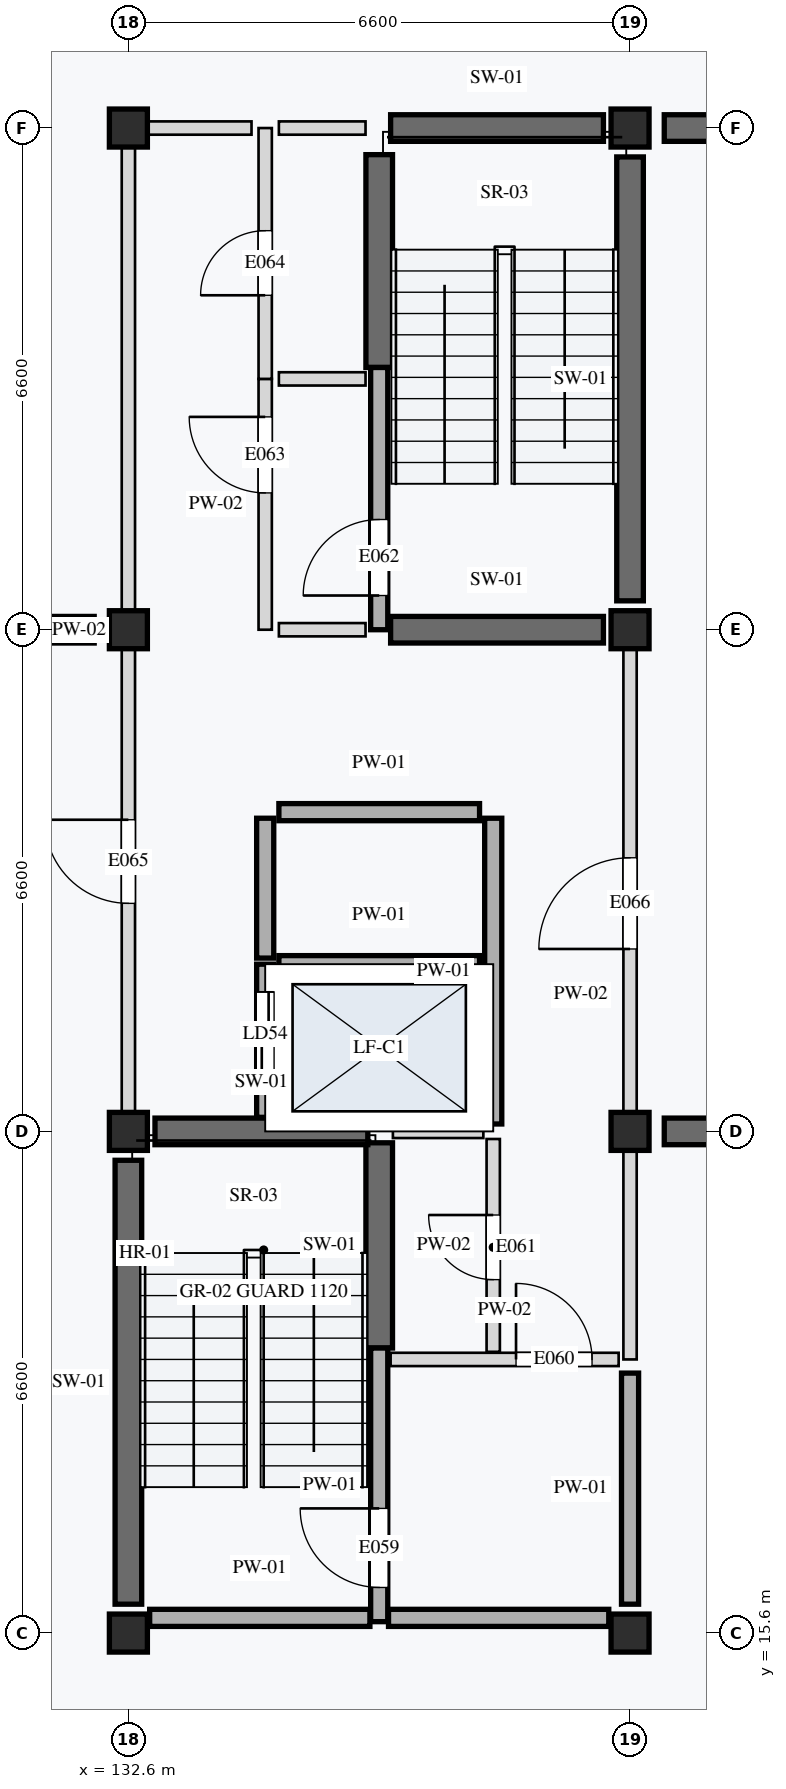
"""IFC4 building model, lengths in metres.
Left out: names, types, materials, properties, quantities, classifications, styles, units other than length and angle.
Written with IfcOpenShell. Run it as: python <this file> out.ifc"""

import sys

from ifc_helpers import new_model, si_unit, direction, frame, frame_2d, origin, origin_2d, place, context, subcontext, project, spatial, rectangle, extrude, element, fill, save


model = new_model("IFC4")
c1 = context("Model", 3, precision=1e-05, world=origin(), true_north=direction((0.0, 1.0)))
c2 = subcontext(c1, "Body", "Model", "MODEL_VIEW")
j1 = project(units=[si_unit("LENGTHUNIT", "METRE"), si_unit("PLANEANGLEUNIT", "RADIAN")], contexts=[c1])
p1 = place(None, origin())
s1 = spatial("IfcSite", under=j1, at=p1, CompositionType="ELEMENT")
p2 = place(p1, origin())
s2 = spatial("IfcBuilding", under=s1, at=p2, CompositionType="ELEMENT")
p3 = place(p2, frame((0.0, 0.0, -3.8)))
s3 = spatial("IfcBuildingStorey", under=s2, at=p3, CompositionType="ELEMENT", Elevation=-3.8)
for number, where, z_axis, x_axis in (
    (1, (132.6, 15.6, 0.0), (0.0, 0.0, 1.0), (1.0, 0.0, 0.0)),
    (2, (139.2, 15.6, 0.0), (0.0, 0.0, 1.0), (1.0, 0.0, 0.0)),
    (3, (132.6, 22.2, 0.0), (0.0, 0.0, 1.0), (1.0, 0.0, 0.0)),
    (4, (139.2, 22.2, 0.0), (0.0, 0.0, 1.0), (1.0, 0.0, 0.0)),
    (5, (132.6, 28.8, 0.0), (0.0, 0.0, 1.0), (1.0, 0.0, 0.0)),
    (6, (139.2, 28.8, 0.0), (0.0, 0.0, 1.0), (1.0, 0.0, 0.0)),
    (7, (132.6, 35.4, 0.0), (0.0, 0.0, 1.0), (1.0, 0.0, 0.0)),
    (8, (139.2, 35.4, 0.0), (0.0, 0.0, 1.0), (1.0, 0.0, 0.0)),
):
    element("IfcColumn", number, at=place(p3, frame(where, z_axis=z_axis, x_axis=x_axis)), inside=s3, PredefinedType="COLUMN", context=c2, shape_type="SweptSolid", body=[
        extrude(rectangle(XDim=0.5, YDim=0.5, at=origin_2d()), origin(), (0.0, 0.0, 1.0), 3.8),
    ])
p4 = place(p3, frame((132.6, 15.98, 0.0), z_axis=(0.0, 0.0, 1.0), x_axis=(0.0, 1.0, 0.0)))
e9 = element("IfcWall", 9, at=p4, inside=s3, PredefinedType="SHEAR", context=c2, shape_type="SweptSolid", body=[
    extrude(rectangle(XDim=5.84, YDim=0.35, at=frame_2d((2.92, 0.0))), origin(), (0.0, 0.0, 1.0), 3.52),
])
p5 = place(p3, frame((135.9, 19.35, 0.0), z_axis=(0.0, 0.0, 1.0), x_axis=(0.0, 1.0, 0.0)))
e10 = element("IfcWall", 10, at=p5, inside=s3, PredefinedType="SHEAR", context=c2, shape_type="SweptSolid", body=[
    extrude(rectangle(XDim=2.7, YDim=0.35, at=frame_2d((1.35, 0.0))), origin(), (0.0, 0.0, 1.0), 3.52),
])
p6 = place(p3, frame((132.95, 22.2, 0.0), z_axis=(0.0, 0.0, 1.0), x_axis=(1.0, 0.0, 0.0)))
e11 = element("IfcWall", 11, at=p6, inside=s3, PredefinedType="SHEAR", context=c2, shape_type="SweptSolid", body=[
    extrude(rectangle(XDim=2.8, YDim=0.35, at=frame_2d((1.4, 0.0))), origin(), (0.0, 0.0, 1.0), 3.52),
])
p7 = place(p3, frame((139.2, 29.18, 0.0), z_axis=(0.0, 0.0, 1.0), x_axis=(0.0, 1.0, 0.0)))
e12 = element("IfcWall", 12, at=p7, inside=s3, PredefinedType="SHEAR", context=c2, shape_type="SweptSolid", body=[
    extrude(rectangle(XDim=5.84, YDim=0.35, at=frame_2d((2.92, 0.0))), origin(), (0.0, 0.0, 1.0), 3.52),
])
for number, where, z_axis, x_axis in (
    (13, (135.9, 32.25, 0.0), (0.0, 0.0, 1.0), (0.0, 1.0, 0.0)),
    (14, (136.05, 28.8, 0.0), (0.0, 0.0, 1.0), (1.0, 0.0, 0.0)),
    (15, (136.05, 35.4, 0.0), (0.0, 0.0, 1.0), (1.0, 0.0, 0.0)),
):
    element("IfcWall", number, at=place(p3, frame(where, z_axis=z_axis, x_axis=x_axis)), inside=s3, PredefinedType="SHEAR", context=c2, shape_type="SweptSolid", body=[
        extrude(rectangle(XDim=2.8, YDim=0.35, at=frame_2d((1.4, 0.0))), origin(), (0.0, 0.0, 1.0), 3.52),
    ])
p8 = place(p3, frame((126.45, 28.8, 0.0), z_axis=(0.0, 0.0, 1.0), x_axis=(1.0, 0.0, 0.0)))
e16 = element("IfcWall", 16, at=p8, inside=s3, PredefinedType="SHEAR", context=c2, shape_type="SweptSolid", body=[
    extrude(rectangle(XDim=5.7, YDim=0.35, at=frame_2d((2.85, 0.0))), origin(), (0.0, 0.0, 1.0), 3.52),
])
for number, where, z_axis, x_axis in (
    (17, (139.65, 22.2, 0.0), (0.0, 0.0, 1.0), (1.0, 0.0, 0.0)),
    (18, (139.65, 35.4, 0.0), (0.0, 0.0, 1.0), (1.0, 0.0, 0.0)),
):
    element("IfcWall", number, at=place(p3, frame(where, z_axis=z_axis, x_axis=x_axis)), inside=s3, PredefinedType="SHEAR", context=c2, shape_type="SweptSolid", body=[
        extrude(rectangle(XDim=5.7, YDim=0.35, at=frame_2d((2.85, 0.0))), origin(), (0.0, 0.0, 1.0), 3.52),
    ])
p9 = place(p3, frame((135.9, 15.75, 0.0), z_axis=(0.0, 0.0, 1.0), x_axis=(0.0, 1.0, 0.0)))
e19 = element("IfcWall", 19, at=p9, inside=s3, PredefinedType="STANDARD", context=c2, shape_type="SweptSolid", body=[
    extrude(rectangle(XDim=3.6, YDim=0.225, at=frame_2d((1.8, 0.0))), origin(), (0.0, 0.0, 1.0), 3.52),
])
p10 = place(p9, frame((0.45, 0.0, 0.0)))
e20 = element("IfcOpeningElement", 20, at=p10, cuts=e19, PredefinedType="OPENING", context=c2, shape_type="SweptSolid", body=[
    extrude(rectangle(XDim=1.04, YDim=2.12, at=frame_2d((0.52, 1.06))), frame((0.0, 0.123, 0.0), z_axis=(0.0, -1.0, 0.0), x_axis=(1.0, 0.0, 0.0)), (0.0, 0.0, 1.0), 0.245),
])
p11 = place(p3, frame((136.05, 19.2, 0.0), z_axis=(0.0, 0.0, 1.0), x_axis=(1.0, 0.0, 0.0)))
e21 = element("IfcWall", 21, at=p11, inside=s3, PredefinedType="PARTITIONING", context=c2, shape_type="SweptSolid", body=[
    extrude(rectangle(XDim=3.0, YDim=0.175, at=frame_2d((1.5, 0.0))), origin(), (0.0, 0.0, 1.0), 3.52),
])
p12 = place(p11, frame((1.65, 0.0, 0.0)))
e22 = element("IfcOpeningElement", 22, at=p12, cuts=e21, PredefinedType="OPENING", context=c2, shape_type="SweptSolid", body=[
    extrude(rectangle(XDim=1.0, YDim=2.1, at=frame_2d((0.5, 1.05))), frame((0.0, 0.097, 0.0), z_axis=(0.0, -1.0, 0.0), x_axis=(1.0, 0.0, 0.0)), (0.0, 0.0, 1.0), 0.195),
])
p13 = place(p3, frame((137.4, 19.3, 0.0), z_axis=(0.0, 0.0, 1.0), x_axis=(0.0, 1.0, 0.0)))
e23 = element("IfcWall", 23, at=p13, inside=s3, PredefinedType="PARTITIONING", context=c2, shape_type="SweptSolid", body=[
    extrude(rectangle(XDim=2.8, YDim=0.175, at=frame_2d((1.4, 0.0))), origin(), (0.0, 0.0, 1.0), 3.52),
])
p14 = place(p13, frame((0.95, 0.0, 0.0)))
e24 = element("IfcOpeningElement", 24, at=p14, cuts=e23, PredefinedType="OPENING", context=c2, shape_type="SweptSolid", body=[
    extrude(rectangle(XDim=0.85, YDim=2.0, at=frame_2d((0.425, 1.0))), frame((0.0, 0.097, 0.0), z_axis=(0.0, -1.0, 0.0), x_axis=(1.0, 0.0, 0.0)), (0.0, 0.0, 1.0), 0.195),
])
p15 = place(p3, frame((136.08, 22.2, 0.0), z_axis=(0.0, 0.0, 1.0), x_axis=(1.0, 0.0, 0.0)))
e25 = element("IfcWall", 25, at=p15, inside=s3, PredefinedType="PARTITIONING", context=c2, shape_type="SweptSolid", body=[
    extrude(rectangle(XDim=1.19, YDim=0.175, at=frame_2d((0.595, 0.0))), origin(), (0.0, 0.0, 1.0), 3.52),
])
p16 = place(p3, frame((134.4, 22.385, 0.0), z_axis=(0.0, 0.0, 1.0), x_axis=(0.0, 1.0, 0.0)))
e26 = element("IfcWall", 26, at=p16, inside=s3, PredefinedType="STANDARD", context=c2, shape_type="SweptSolid", body=[
    extrude(rectangle(XDim=2.015, YDim=0.225, at=frame_2d((1.007, 0.0))), origin(), (0.0, 0.0, 1.0), 3.52),
])
p17 = place(p16, frame((0.55, 0.0, 0.0)))
e27 = element("IfcOpeningElement", 27, at=p17, cuts=e26, PredefinedType="OPENING", context=c2, shape_type="SweptSolid", body=[
    extrude(rectangle(XDim=1.1, YDim=2.1, at=frame_2d((0.55, 1.05))), frame((0.0, 0.123, 0.0), z_axis=(0.0, -1.0, 0.0), x_axis=(1.0, 0.0, 0.0)), (0.0, 0.0, 1.0), 0.245),
])
p18 = place(p3, frame((134.4, 24.48, 0.0), z_axis=(0.0, 0.0, 1.0), x_axis=(0.0, 1.0, 0.0)))
e28 = element("IfcWall", 28, at=p18, inside=s3, PredefinedType="STANDARD", context=c2, shape_type="SweptSolid", body=[
    extrude(rectangle(XDim=1.84, YDim=0.225, at=frame_2d((0.92, 0.0))), origin(), (0.0, 0.0, 1.0), 3.52),
])
p19 = place(p3, frame((137.4, 22.298, 0.0), z_axis=(0.0, 0.0, 1.0), x_axis=(0.0, 1.0, 0.0)))
e29 = element("IfcWall", 29, at=p19, inside=s3, PredefinedType="STANDARD", context=c2, shape_type="SweptSolid", body=[
    extrude(rectangle(XDim=4.022, YDim=0.225, at=frame_2d((2.011, 0.0))), origin(), (0.0, 0.0, 1.0), 3.52),
])
for number, where, z_axis, x_axis in (
    (30, (134.58, 24.4, 0.0), (0.0, 0.0, 1.0), (1.0, 0.0, 0.0)),
    (31, (134.58, 26.4, 0.0), (0.0, 0.0, 1.0), (1.0, 0.0, 0.0)),
):
    element("IfcWall", number, at=place(p3, frame(where, z_axis=z_axis, x_axis=x_axis)), inside=s3, PredefinedType="STANDARD", context=c2, shape_type="SweptSolid", body=[
        extrude(rectangle(XDim=2.64, YDim=0.225, at=frame_2d((1.32, 0.0))), origin(), (0.0, 0.0, 1.0), 3.52),
    ])
p20 = place(p3, frame((135.9, 28.8, 0.0), z_axis=(0.0, 0.0, 1.0), x_axis=(0.0, 1.0, 0.0)))
e32 = element("IfcWall", 32, at=p20, inside=s3, PredefinedType="STANDARD", context=c2, shape_type="SweptSolid", body=[
    extrude(rectangle(XDim=3.45, YDim=0.225, at=frame_2d((1.725, 0.0))), origin(), (0.0, 0.0, 1.0), 3.52),
])
p21 = place(p20, frame((0.45, 0.0, 0.0)))
e33 = element("IfcOpeningElement", 33, at=p21, cuts=e32, PredefinedType="OPENING", context=c2, shape_type="SweptSolid", body=[
    extrude(rectangle(XDim=1.0, YDim=2.1, at=frame_2d((0.5, 1.05))), frame((0.0, 0.123, 0.0), z_axis=(0.0, -1.0, 0.0), x_axis=(1.0, 0.0, 0.0)), (0.0, 0.0, 1.0), 0.245),
])
p22 = place(p3, frame((134.4, 28.8, 0.0), z_axis=(0.0, 0.0, 1.0), x_axis=(0.0, 1.0, 0.0)))
e34 = element("IfcWall", 34, at=p22, inside=s3, PredefinedType="PARTITIONING", context=c2, shape_type="SweptSolid", body=[
    extrude(rectangle(XDim=3.3, YDim=0.175, at=frame_2d((1.65, 0.0))), origin(), (0.0, 0.0, 1.0), 3.52),
])
p23 = place(p22, frame((1.8, 0.0, 0.0)))
e35 = element("IfcOpeningElement", 35, at=p23, cuts=e34, PredefinedType="OPENING", context=c2, shape_type="SweptSolid", body=[
    extrude(rectangle(XDim=1.0, YDim=2.16, at=frame_2d((0.5, 1.08))), frame((0.0, 0.097, 0.0), z_axis=(0.0, -1.0, 0.0), x_axis=(1.0, 0.0, 0.0)), (0.0, 0.0, 1.0), 0.195),
])
p24 = place(p3, frame((134.4, 32.1, 0.0), z_axis=(0.0, 0.0, 1.0), x_axis=(0.0, 1.0, 0.0)))
e36 = element("IfcWall", 36, at=p24, inside=s3, PredefinedType="PARTITIONING", context=c2, shape_type="SweptSolid", body=[
    extrude(rectangle(XDim=3.3, YDim=0.175, at=frame_2d((1.65, 0.0))), origin(), (0.0, 0.0, 1.0), 3.52),
])
p25 = place(p24, frame((1.1, 0.0, 0.0)))
e37 = element("IfcOpeningElement", 37, at=p25, cuts=e36, PredefinedType="OPENING", context=c2, shape_type="SweptSolid", body=[
    extrude(rectangle(XDim=0.85, YDim=2.0, at=frame_2d((0.425, 1.0))), frame((0.0, 0.097, 0.0), z_axis=(0.0, -1.0, 0.0), x_axis=(1.0, 0.0, 0.0)), (0.0, 0.0, 1.0), 0.195),
])
p26 = place(p3, frame((134.58, 28.8, 0.0), z_axis=(0.0, 0.0, 1.0), x_axis=(1.0, 0.0, 0.0)))
e38 = element("IfcWall", 38, at=p26, inside=s3, PredefinedType="PARTITIONING", context=c2, shape_type="SweptSolid", body=[
    extrude(rectangle(XDim=1.14, YDim=0.175, at=frame_2d((0.57, 0.0))), origin(), (0.0, 0.0, 1.0), 3.35),
])
for number, where, z_axis, x_axis in (
    (39, (134.58, 32.1, 0.0), (0.0, 0.0, 1.0), (1.0, 0.0, 0.0)),
    (40, (134.58, 35.4, 0.0), (0.0, 0.0, 1.0), (1.0, 0.0, 0.0)),
):
    element("IfcWall", number, at=place(p3, frame(where, z_axis=z_axis, x_axis=x_axis)), inside=s3, PredefinedType="PARTITIONING", context=c2, shape_type="SweptSolid", body=[
        extrude(rectangle(XDim=1.14, YDim=0.175, at=frame_2d((0.57, 0.0))), origin(), (0.0, 0.0, 1.0), 3.52),
    ])
p27 = place(p3, frame((132.6, 22.2, 0.0), z_axis=(0.0, 0.0, 1.0), x_axis=(0.0, 1.0, 0.0)))
e41 = element("IfcWall", 41, at=p27, inside=s3, PredefinedType="PARTITIONING", context=c2, shape_type="SweptSolid", body=[
    extrude(rectangle(XDim=13.2, YDim=0.175, at=frame_2d((6.6, 0.0))), origin(), (0.0, 0.0, 1.0), 3.15),
])
p28 = place(p27, frame((3.0, 0.0, 0.0)))
e42 = element("IfcOpeningElement", 42, at=p28, cuts=e41, PredefinedType="OPENING", context=c2, shape_type="SweptSolid", body=[
    extrude(rectangle(XDim=1.1, YDim=2.15, at=frame_2d((0.55, 1.075))), frame((0.0, 0.097, 0.0), z_axis=(0.0, -1.0, 0.0), x_axis=(1.0, 0.0, 0.0)), (0.0, 0.0, 1.0), 0.195),
])
p29 = place(p3, frame((139.2, 19.2, 0.0), z_axis=(0.0, 0.0, 1.0), x_axis=(0.0, 1.0, 0.0)))
e43 = element("IfcWall", 43, at=p29, inside=s3, PredefinedType="PARTITIONING", context=c2, shape_type="SweptSolid", body=[
    extrude(rectangle(XDim=9.6, YDim=0.175, at=frame_2d((4.8, 0.0))), origin(), (0.0, 0.0, 1.0), 3.15),
])
p30 = place(p29, frame((5.4, 0.0, 0.0)))
e44 = element("IfcOpeningElement", 44, at=p30, cuts=e43, PredefinedType="OPENING", context=c2, shape_type="SweptSolid", body=[
    extrude(rectangle(XDim=1.2, YDim=2.18, at=frame_2d((0.6, 1.09))), frame((0.0, 0.097, 0.0), z_axis=(0.0, -1.0, 0.0), x_axis=(1.0, 0.0, 0.0)), (0.0, 0.0, 1.0), 0.195),
])
p31 = place(p3, frame((132.78, 35.4, 0.0), z_axis=(0.0, 0.0, 1.0), x_axis=(1.0, 0.0, 0.0)))
e45 = element("IfcWall", 45, at=p31, inside=s3, PredefinedType="PARTITIONING", context=c2, shape_type="SweptSolid", body=[
    extrude(rectangle(XDim=1.44, YDim=0.175, at=frame_2d((0.72, 0.0))), origin(), (0.0, 0.0, 1.0), 3.52),
])
p32 = place(p3, frame((139.2, 15.98, 0.0), z_axis=(0.0, 0.0, 1.0), x_axis=(0.0, 1.0, 0.0)))
e46 = element("IfcWall", 46, at=p32, inside=s3, PredefinedType="STANDARD", context=c2, shape_type="SweptSolid", body=[
    extrude(rectangle(XDim=3.04, YDim=0.225, at=frame_2d((1.52, 0.0))), origin(), (0.0, 0.0, 1.0), 3.15),
])
p33 = place(p3, frame((132.88, 15.8, 0.0), z_axis=(0.0, 0.0, 1.0), x_axis=(1.0, 0.0, 0.0)))
e47 = element("IfcWall", 47, at=p33, inside=s3, PredefinedType="STANDARD", context=c2, shape_type="SweptSolid", body=[
    extrude(rectangle(XDim=2.898, YDim=0.225, at=frame_2d((1.449, 0.0))), origin(), (0.0, 0.0, 1.0), 3.52),
])
p34 = place(p3, frame((136.022, 15.8, 0.0), z_axis=(0.0, 0.0, 1.0), x_axis=(1.0, 0.0, 0.0)))
e48 = element("IfcWall", 48, at=p34, inside=s3, PredefinedType="STANDARD", context=c2, shape_type="SweptSolid", body=[
    extrude(rectangle(XDim=2.897, YDim=0.225, at=frame_2d((1.449, 0.0))), origin(), (0.0, 0.0, 1.0), 3.52),
])
p35 = place(p10, origin())
e49 = element("IfcDoor", 49, at=p35, inside=s3, OperationType="SINGLE_SWING_RIGHT", PredefinedType="DOOR", context=c2, shape_type="SweptSolid", body=[
    extrude(rectangle(XDim=1.04, YDim=2.12, at=frame_2d((0.52, 1.06))), frame((0.0, 0.025, 0.0), z_axis=(0.0, -1.0, 0.0), x_axis=(1.0, 0.0, 0.0)), (0.0, 0.0, 1.0), 0.05),
])
fill(e20, e49)
p36 = place(p12, origin())
e50 = element("IfcDoor", 50, at=p36, inside=s3, OperationType="SINGLE_SWING_LEFT", PredefinedType="DOOR", context=c2, shape_type="SweptSolid", body=[
    extrude(rectangle(XDim=1.0, YDim=2.1, at=frame_2d((0.5, 1.05))), frame((0.0, 0.025, 0.0), z_axis=(0.0, -1.0, 0.0), x_axis=(1.0, 0.0, 0.0)), (0.0, 0.0, 1.0), 0.05),
])
fill(e22, e50)
p37 = place(p14, origin())
e51 = element("IfcDoor", 51, at=p37, inside=s3, OperationType="SINGLE_SWING_RIGHT", PredefinedType="DOOR", context=c2, shape_type="SweptSolid", body=[
    extrude(rectangle(XDim=0.85, YDim=2.0, at=frame_2d((0.425, 1.0))), frame((0.0, 0.025, 0.0), z_axis=(0.0, -1.0, 0.0), x_axis=(1.0, 0.0, 0.0)), (0.0, 0.0, 1.0), 0.05),
])
fill(e24, e51)
p38 = place(p17, origin())
e52 = element("IfcDoor", 52, at=p38, inside=s3, OperationType="DOUBLE_DOOR_SLIDING", PredefinedType="DOOR", context=c2, shape_type="SweptSolid", body=[
    extrude(rectangle(XDim=1.1, YDim=2.1, at=frame_2d((0.55, 1.05))), frame((0.0, 0.025, 0.0), z_axis=(0.0, -1.0, 0.0), x_axis=(1.0, 0.0, 0.0)), (0.0, 0.0, 1.0), 0.05),
])
fill(e27, e52)
p39 = place(p21, origin())
e53 = element("IfcDoor", 53, at=p39, inside=s3, OperationType="SINGLE_SWING_LEFT", PredefinedType="DOOR", context=c2, shape_type="SweptSolid", body=[
    extrude(rectangle(XDim=1.0, YDim=2.1, at=frame_2d((0.5, 1.05))), frame((0.0, 0.025, 0.0), z_axis=(0.0, -1.0, 0.0), x_axis=(1.0, 0.0, 0.0)), (0.0, 0.0, 1.0), 0.05),
])
fill(e33, e53)
p40 = place(p23, origin())
e54 = element("IfcDoor", 54, at=p40, inside=s3, OperationType="SINGLE_SWING_RIGHT", PredefinedType="DOOR", context=c2, shape_type="SweptSolid", body=[
    extrude(rectangle(XDim=1.0, YDim=2.16, at=frame_2d((0.5, 1.08))), frame((0.0, 0.025, 0.0), z_axis=(0.0, -1.0, 0.0), x_axis=(1.0, 0.0, 0.0)), (0.0, 0.0, 1.0), 0.05),
])
fill(e35, e54)
p41 = place(p25, origin())
e55 = element("IfcDoor", 55, at=p41, inside=s3, OperationType="SINGLE_SWING_LEFT", PredefinedType="DOOR", context=c2, shape_type="SweptSolid", body=[
    extrude(rectangle(XDim=0.85, YDim=2.0, at=frame_2d((0.425, 1.0))), frame((0.0, 0.025, 0.0), z_axis=(0.0, -1.0, 0.0), x_axis=(1.0, 0.0, 0.0)), (0.0, 0.0, 1.0), 0.05),
])
fill(e37, e55)
p42 = place(p28, origin())
e56 = element("IfcDoor", 56, at=p42, inside=s3, OperationType="SINGLE_SWING_RIGHT", PredefinedType="DOOR", context=c2, shape_type="SweptSolid", body=[
    extrude(rectangle(XDim=1.1, YDim=2.15, at=frame_2d((0.55, 1.075))), frame((0.0, 0.025, 0.0), z_axis=(0.0, -1.0, 0.0), x_axis=(1.0, 0.0, 0.0)), (0.0, 0.0, 1.0), 0.05),
])
fill(e42, e56)
p43 = place(p30, origin())
e57 = element("IfcDoor", 57, at=p43, inside=s3, OperationType="SINGLE_SWING_LEFT", PredefinedType="DOOR", context=c2, shape_type="SweptSolid", body=[
    extrude(rectangle(XDim=1.2, YDim=2.18, at=frame_2d((0.6, 1.09))), frame((0.0, 0.025, 0.0), z_axis=(0.0, -1.0, 0.0), x_axis=(1.0, 0.0, 0.0)), (0.0, 0.0, 1.0), 0.05),
])
fill(e44, e57)
save(model, sys.argv[1])
